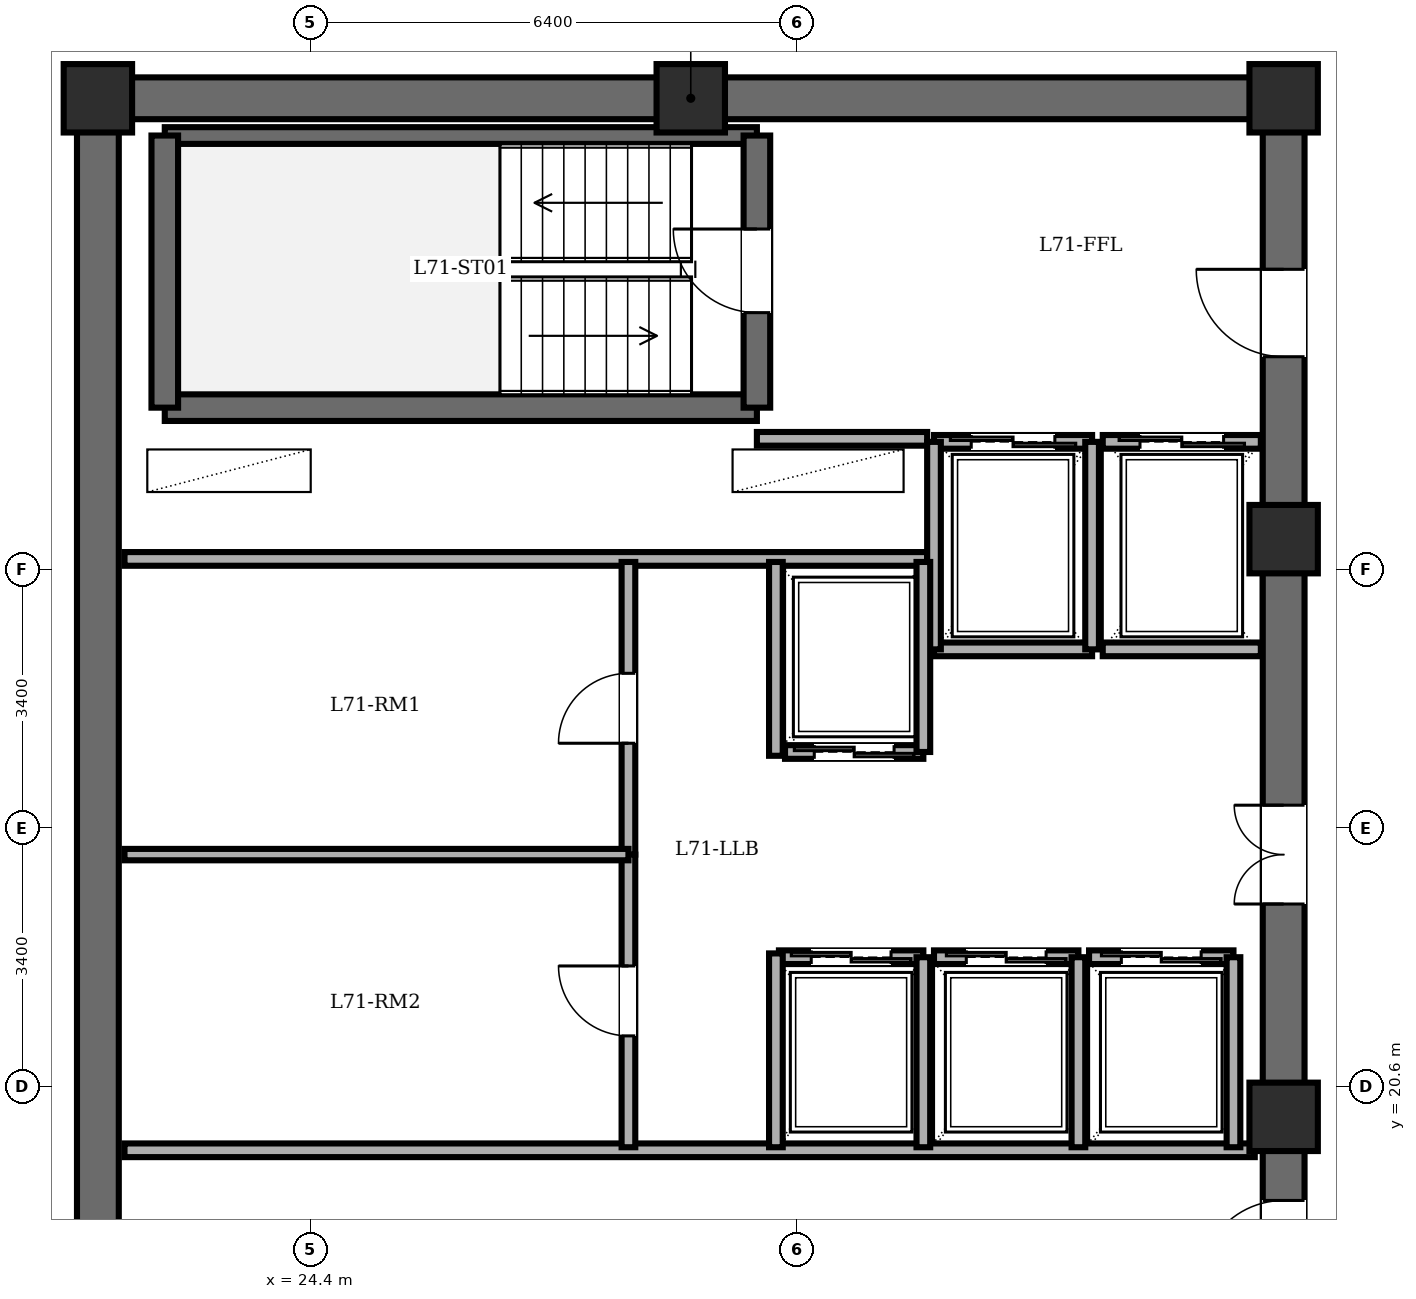
"""IFC4 building model, lengths in metres.
Left out: names, types, materials, properties, quantities, classifications, styles, units other than length and angle.
Written with IfcOpenShell. Run it as: python <this file> out.ifc"""

import sys

from ifc_helpers import new_model, si_unit, direction, frame, frame_2d, origin, origin_2d, place, context, subcontext, project, spatial, rectangle, extrude, element, fill, save


model = new_model("IFC4")
c1 = context("Model", 3, precision=1e-05, world=origin(), true_north=direction((0.0, 1.0)))
c2 = subcontext(c1, "Body", "Model", "MODEL_VIEW")
j1 = project(units=[si_unit("LENGTHUNIT", "METRE"), si_unit("PLANEANGLEUNIT", "RADIAN")], contexts=[c1])
p1 = place(None, origin())
s1 = spatial("IfcSite", under=j1, at=p1, CompositionType="ELEMENT")
p2 = place(p1, origin())
s2 = spatial("IfcBuilding", under=s1, at=p2, CompositionType="ELEMENT")
p3 = place(p2, frame((0.0, 0.0, 273.4)))
s3 = spatial("IfcBuildingStorey", under=s2, at=p3, CompositionType="ELEMENT", Elevation=273.4)
for number, where, z_axis, x_axis in (
    (1, (37.2, 20.2, 0.0), (0.0, 0.0, 1.0), (1.0, 0.0, 0.0)),
    (2, (37.2, 27.8, 0.0), (0.0, 0.0, 1.0), (1.0, 0.0, 0.0)),
    (3, (37.2, 33.6, 0.0), (0.0, 0.0, 1.0), (1.0, 0.0, 0.0)),
    (4, (29.4, 33.6, 0.0), (0.0, 0.0, 1.0), (1.0, 0.0, 0.0)),
    (5, (21.6, 33.6, 0.0), (0.0, 0.0, 1.0), (1.0, 0.0, 0.0)),
):
    element("IfcColumn", number, at=place(p3, frame(where, z_axis=z_axis, x_axis=x_axis)), inside=s3, PredefinedType="COLUMN", context=c2, shape_type="SweptSolid", body=[
        extrude(rectangle(XDim=0.9, YDim=0.9, at=origin_2d()), origin(), (0.0, 0.0, 1.0), 3.65),
    ])
p4 = place(p3, frame((21.6, 14.4, 0.0), z_axis=(0.0, 0.0, 1.0), x_axis=(0.0, 1.0, 0.0)))
e6 = element("IfcWall", 6, at=p4, inside=s3, PredefinedType="SHEAR", context=c2, shape_type="SweptSolid", body=[
    extrude(rectangle(XDim=19.2, YDim=0.55, at=frame_2d((9.6, 0.0))), origin(), (0.0, 0.0, 1.0), 3.45),
])
p5 = place(p3, frame((21.6, 33.6, 0.0), z_axis=(0.0, 0.0, 1.0), x_axis=(1.0, 0.0, 0.0)))
e7 = element("IfcWall", 7, at=p5, inside=s3, PredefinedType="SHEAR", context=c2, shape_type="SweptSolid", body=[
    extrude(rectangle(XDim=15.6, YDim=0.55, at=frame_2d((7.8, 0.0))), origin(), (0.0, 0.0, 1.0), 3.45),
])
p6 = place(p3, frame((37.2, 14.4, 0.0), z_axis=(0.0, 0.0, 1.0), x_axis=(0.0, 1.0, 0.0)))
e8 = element("IfcWall", 8, at=p6, inside=s3, PredefinedType="SHEAR", context=c2, shape_type="SweptSolid", body=[
    extrude(rectangle(XDim=19.2, YDim=0.55, at=frame_2d((9.6, 0.0))), origin(), (0.0, 0.0, 1.0), 3.45),
])
p7 = place(p6, frame((15.8, 0.0, 0.0)))
e9 = element("IfcOpeningElement", 9, at=p7, cuts=e8, PredefinedType="OPENING", context=c2, shape_type="SweptSolid", body=[
    extrude(rectangle(XDim=1.15, YDim=2.15, at=frame_2d((0.575, 1.075))), frame((0.0, 0.285, 0.0), z_axis=(0.0, -1.0, 0.0), x_axis=(1.0, 0.0, 0.0)), (0.0, 0.0, 1.0), 0.57),
])
p8 = place(p6, frame((3.6, 0.0, 0.0)))
e10 = element("IfcOpeningElement", 10, at=p8, cuts=e8, PredefinedType="OPENING", context=c2, shape_type="SweptSolid", body=[
    extrude(rectangle(XDim=1.1, YDim=2.15, at=frame_2d((0.55, 1.075))), frame((0.0, 0.285, 0.0), z_axis=(0.0, -1.0, 0.0), x_axis=(1.0, 0.0, 0.0)), (0.0, 0.0, 1.0), 0.57),
])
p9 = place(p6, frame((8.6, 0.0, 0.0)))
e11 = element("IfcOpeningElement", 11, at=p9, cuts=e8, PredefinedType="OPENING", context=c2, shape_type="SweptSolid", body=[
    extrude(rectangle(XDim=1.3, YDim=2.2, at=frame_2d((0.65, 1.1))), frame((0.0, 0.285, 0.0), z_axis=(0.0, -1.0, 0.0), x_axis=(1.0, 0.0, 0.0)), (0.0, 0.0, 1.0), 0.57),
])
p10 = place(p3, frame((22.48, 29.53, 0.0), z_axis=(0.0, 0.0, 1.0), x_axis=(1.0, 0.0, 0.0)))
e12 = element("IfcWall", 12, at=p10, inside=s3, PredefinedType="SOLIDWALL", context=c2, shape_type="SweptSolid", body=[
    extrude(rectangle(XDim=7.79, YDim=0.35, at=frame_2d((3.895, 0.0))), origin(), (0.0, 0.0, 1.0), 3.45),
])
p11 = place(p3, frame((22.48, 33.11, 0.0), z_axis=(0.0, 0.0, 1.0), x_axis=(1.0, 0.0, 0.0)))
e13 = element("IfcWall", 13, at=p11, inside=s3, PredefinedType="PARTITIONING", context=c2, shape_type="SweptSolid", body=[
    extrude(rectangle(XDim=7.79, YDim=0.22, at=frame_2d((3.895, 0.0))), origin(), (0.0, 0.0, 1.0), 3.45),
])
p12 = place(p3, frame((22.48, 29.53, 0.0), z_axis=(0.0, 0.0, 1.0), x_axis=(0.0, 1.0, 0.0)))
e14 = element("IfcWall", 14, at=p12, inside=s3, PredefinedType="SOLIDWALL", context=c2, shape_type="SweptSolid", body=[
    extrude(rectangle(XDim=3.58, YDim=0.35, at=frame_2d((1.79, 0.0))), origin(), (0.0, 0.0, 1.0), 3.45),
])
p13 = place(p3, frame((30.27, 29.53, 0.0), z_axis=(0.0, 0.0, 1.0), x_axis=(0.0, 1.0, 0.0)))
e15 = element("IfcWall", 15, at=p13, inside=s3, PredefinedType="SOLIDWALL", context=c2, shape_type="SweptSolid", body=[
    extrude(rectangle(XDim=3.58, YDim=0.35, at=frame_2d((1.79, 0.0))), origin(), (0.0, 0.0, 1.0), 3.45),
])
p14 = place(p13, frame((1.25, 0.0, 0.0)))
e16 = element("IfcOpeningElement", 16, at=p14, cuts=e15, PredefinedType="OPENING", context=c2, shape_type="SweptSolid", body=[
    extrude(rectangle(XDim=1.1, YDim=2.15, at=frame_2d((0.55, 1.075))), frame((0.0, 0.185, 0.0), z_axis=(0.0, -1.0, 0.0), x_axis=(1.0, 0.0, 0.0)), (0.0, 0.0, 1.0), 0.37),
])
p15 = place(p3, frame((30.27, 29.12, 0.0), z_axis=(0.0, 0.0, 1.0), x_axis=(1.0, 0.0, 0.0)))
e17 = element("IfcWall", 17, at=p15, inside=s3, PredefinedType="PARTITIONING", context=c2, shape_type="SweptSolid", body=[
    extrude(rectangle(XDim=2.24, YDim=0.18, at=frame_2d((1.12, 0.0))), origin(), (0.0, 0.0, 1.0), 3.45),
])
p16 = place(p3, frame((21.95, 27.54, 0.0), z_axis=(0.0, 0.0, 1.0), x_axis=(1.0, 0.0, 0.0)))
e18 = element("IfcWall", 18, at=p16, inside=s3, PredefinedType="PARTITIONING", context=c2, shape_type="SweptSolid", body=[
    extrude(rectangle(XDim=10.56, YDim=0.18, at=frame_2d((5.28, 0.0))), origin(), (0.0, 0.0, 1.0), 3.45),
])
p17 = place(p3, frame((21.95, 19.76, 0.0), z_axis=(0.0, 0.0, 1.0), x_axis=(1.0, 0.0, 0.0)))
e19 = element("IfcWall", 19, at=p17, inside=s3, PredefinedType="PARTITIONING", context=c2, shape_type="SweptSolid", body=[
    extrude(rectangle(XDim=14.87, YDim=0.18, at=frame_2d((7.435, 0.0))), origin(), (0.0, 0.0, 1.0), 3.45),
])
p18 = place(p3, frame((32.6, 29.08, 0.0), z_axis=(0.0, 0.0, 1.0), x_axis=(1.0, 0.0, 0.0)))
e20 = element("IfcWall", 20, at=p18, inside=s3, PredefinedType="PARTITIONING", context=c2, shape_type="SweptSolid", body=[
    extrude(rectangle(XDim=2.08, YDim=0.18, at=frame_2d((1.04, 0.0))), origin(), (0.0, 0.0, 1.0), 3.45),
])
p19 = place(p18, frame((0.49, 0.0, 0.0)))
e21 = element("IfcOpeningElement", 21, at=p19, cuts=e20, PredefinedType="OPENING", context=c2, shape_type="SweptSolid", body=[
    extrude(rectangle(XDim=1.1, YDim=2.2, at=frame_2d((0.55, 1.1))), frame((0.0, 0.1, 0.0), z_axis=(0.0, -1.0, 0.0), x_axis=(1.0, 0.0, 0.0)), (0.0, 0.0, 1.0), 0.2),
])
p20 = place(p3, frame((34.68, 26.35, 0.0), z_axis=(0.0, 0.0, 1.0), x_axis=(-1.0, 0.0, 0.0)))
e22 = element("IfcWall", 22, at=p20, inside=s3, PredefinedType="PARTITIONING", context=c2, shape_type="SweptSolid", body=[
    extrude(rectangle(XDim=2.08, YDim=0.18, at=frame_2d((1.04, 0.0))), origin(), (0.0, 0.0, 1.0), 3.45),
])
for number, where, z_axis, x_axis in (
    (23, (34.68, 26.35, 0.0), (0.0, 0.0, 1.0), (0.0, 1.0, 0.0)),
    (24, (32.6, 29.08, 0.0), (0.0, 0.0, 1.0), (0.0, -1.0, 0.0)),
):
    element("IfcWall", number, at=place(p3, frame(where, z_axis=z_axis, x_axis=x_axis)), inside=s3, PredefinedType="PARTITIONING", context=c2, shape_type="SweptSolid", body=[
        extrude(rectangle(XDim=2.73, YDim=0.18, at=frame_2d((1.365, 0.0))), origin(), (0.0, 0.0, 1.0), 3.45),
    ])
p21 = place(p3, frame((34.82, 29.08, 0.0), z_axis=(0.0, 0.0, 1.0), x_axis=(1.0, 0.0, 0.0)))
e25 = element("IfcWall", 25, at=p21, inside=s3, PredefinedType="PARTITIONING", context=c2, shape_type="SweptSolid", body=[
    extrude(rectangle(XDim=2.08, YDim=0.18, at=frame_2d((1.04, 0.0))), origin(), (0.0, 0.0, 1.0), 3.45),
])
p22 = place(p21, frame((0.49, 0.0, 0.0)))
e26 = element("IfcOpeningElement", 26, at=p22, cuts=e25, PredefinedType="OPENING", context=c2, shape_type="SweptSolid", body=[
    extrude(rectangle(XDim=1.1, YDim=2.2, at=frame_2d((0.55, 1.1))), frame((0.0, 0.1, 0.0), z_axis=(0.0, -1.0, 0.0), x_axis=(1.0, 0.0, 0.0)), (0.0, 0.0, 1.0), 0.2),
])
p23 = place(p3, frame((36.9, 26.35, 0.0), z_axis=(0.0, 0.0, 1.0), x_axis=(-1.0, 0.0, 0.0)))
e27 = element("IfcWall", 27, at=p23, inside=s3, PredefinedType="PARTITIONING", context=c2, shape_type="SweptSolid", body=[
    extrude(rectangle(XDim=2.08, YDim=0.18, at=frame_2d((1.04, 0.0))), origin(), (0.0, 0.0, 1.0), 3.45),
])
p24 = place(p3, frame((32.46, 25.0, 0.0), z_axis=(0.0, 0.0, 1.0), x_axis=(-1.0, 0.0, 0.0)))
e28 = element("IfcWall", 28, at=p24, inside=s3, PredefinedType="PARTITIONING", context=c2, shape_type="SweptSolid", body=[
    extrude(rectangle(XDim=1.82, YDim=0.18, at=frame_2d((0.91, 0.0))), origin(), (0.0, 0.0, 1.0), 3.45),
])
p25 = place(p24, frame((0.385, 0.0, 0.0)))
e29 = element("IfcOpeningElement", 29, at=p25, cuts=e28, PredefinedType="OPENING", context=c2, shape_type="SweptSolid", body=[
    extrude(rectangle(XDim=1.05, YDim=2.2, at=frame_2d((0.525, 1.1))), frame((0.0, 0.1, 0.0), z_axis=(0.0, -1.0, 0.0), x_axis=(1.0, 0.0, 0.0)), (0.0, 0.0, 1.0), 0.2),
])
p26 = place(p3, frame((32.46, 25.0, 0.0), z_axis=(0.0, 0.0, 1.0), x_axis=(0.0, 1.0, 0.0)))
e30 = element("IfcWall", 30, at=p26, inside=s3, PredefinedType="PARTITIONING", context=c2, shape_type="SweptSolid", body=[
    extrude(rectangle(XDim=2.5, YDim=0.18, at=frame_2d((1.25, 0.0))), origin(), (0.0, 0.0, 1.0), 3.45),
])
p27 = place(p3, frame((30.56, 22.3, 0.0), z_axis=(0.0, 0.0, 1.0), x_axis=(1.0, 0.0, 0.0)))
e31 = element("IfcWall", 31, at=p27, inside=s3, PredefinedType="PARTITIONING", context=c2, shape_type="SweptSolid", body=[
    extrude(rectangle(XDim=1.9, YDim=0.18, at=frame_2d((0.95, 0.0))), origin(), (0.0, 0.0, 1.0), 3.45),
])
p28 = place(p27, frame((0.425, 0.0, 0.0)))
e32 = element("IfcOpeningElement", 32, at=p28, cuts=e31, PredefinedType="OPENING", context=c2, shape_type="SweptSolid", body=[
    extrude(rectangle(XDim=1.05, YDim=2.2, at=frame_2d((0.525, 1.1))), frame((0.0, 0.1, 0.0), z_axis=(0.0, -1.0, 0.0), x_axis=(1.0, 0.0, 0.0)), (0.0, 0.0, 1.0), 0.2),
])
p29 = place(p3, frame((32.46, 19.8, 0.0), z_axis=(0.0, 0.0, 1.0), x_axis=(0.0, 1.0, 0.0)))
e33 = element("IfcWall", 33, at=p29, inside=s3, PredefinedType="PARTITIONING", context=c2, shape_type="SweptSolid", body=[
    extrude(rectangle(XDim=2.5, YDim=0.18, at=frame_2d((1.25, 0.0))), origin(), (0.0, 0.0, 1.0), 3.45),
])
p30 = place(p3, frame((32.6, 22.3, 0.0), z_axis=(0.0, 0.0, 1.0), x_axis=(1.0, 0.0, 0.0)))
e34 = element("IfcWall", 34, at=p30, inside=s3, PredefinedType="PARTITIONING", context=c2, shape_type="SweptSolid", body=[
    extrude(rectangle(XDim=1.9, YDim=0.18, at=frame_2d((0.95, 0.0))), origin(), (0.0, 0.0, 1.0), 3.45),
])
p31 = place(p30, frame((0.425, 0.0, 0.0)))
e35 = element("IfcOpeningElement", 35, at=p31, cuts=e34, PredefinedType="OPENING", context=c2, shape_type="SweptSolid", body=[
    extrude(rectangle(XDim=1.05, YDim=2.2, at=frame_2d((0.525, 1.1))), frame((0.0, 0.1, 0.0), z_axis=(0.0, -1.0, 0.0), x_axis=(1.0, 0.0, 0.0)), (0.0, 0.0, 1.0), 0.2),
])
p32 = place(p3, frame((34.5, 19.8, 0.0), z_axis=(0.0, 0.0, 1.0), x_axis=(0.0, 1.0, 0.0)))
e36 = element("IfcWall", 36, at=p32, inside=s3, PredefinedType="PARTITIONING", context=c2, shape_type="SweptSolid", body=[
    extrude(rectangle(XDim=2.5, YDim=0.18, at=frame_2d((1.25, 0.0))), origin(), (0.0, 0.0, 1.0), 3.45),
])
p33 = place(p3, frame((34.64, 22.3, 0.0), z_axis=(0.0, 0.0, 1.0), x_axis=(1.0, 0.0, 0.0)))
e37 = element("IfcWall", 37, at=p33, inside=s3, PredefinedType="PARTITIONING", context=c2, shape_type="SweptSolid", body=[
    extrude(rectangle(XDim=1.9, YDim=0.18, at=frame_2d((0.95, 0.0))), origin(), (0.0, 0.0, 1.0), 3.45),
])
p34 = place(p33, frame((0.425, 0.0, 0.0)))
e38 = element("IfcOpeningElement", 38, at=p34, cuts=e37, PredefinedType="OPENING", context=c2, shape_type="SweptSolid", body=[
    extrude(rectangle(XDim=1.05, YDim=2.2, at=frame_2d((0.525, 1.1))), frame((0.0, 0.1, 0.0), z_axis=(0.0, -1.0, 0.0), x_axis=(1.0, 0.0, 0.0)), (0.0, 0.0, 1.0), 0.2),
])
p35 = place(p3, frame((36.54, 19.8, 0.0), z_axis=(0.0, 0.0, 1.0), x_axis=(0.0, 1.0, 0.0)))
e39 = element("IfcWall", 39, at=p35, inside=s3, PredefinedType="PARTITIONING", context=c2, shape_type="SweptSolid", body=[
    extrude(rectangle(XDim=2.5, YDim=0.18, at=frame_2d((1.25, 0.0))), origin(), (0.0, 0.0, 1.0), 3.45),
])
for number, where, z_axis, x_axis in (
    (40, (30.52, 24.95, 0.0), (0.0, 0.0, 1.0), (0.0, 1.0, 0.0)),
    (41, (30.52, 19.8, 0.0), (0.0, 0.0, 1.0), (0.0, 1.0, 0.0)),
):
    element("IfcWall", number, at=place(p3, frame(where, z_axis=z_axis, x_axis=x_axis)), inside=s3, PredefinedType="PARTITIONING", context=c2, shape_type="SweptSolid", body=[
        extrude(rectangle(XDim=2.55, YDim=0.18, at=frame_2d((1.275, 0.0))), origin(), (0.0, 0.0, 1.0), 3.45),
    ])
p36 = place(p3, frame((28.58, 23.65, 0.0), z_axis=(0.0, 0.0, 1.0), x_axis=(0.0, 1.0, 0.0)))
e42 = element("IfcWall", 42, at=p36, inside=s3, PredefinedType="PARTITIONING", context=c2, shape_type="SweptSolid", body=[
    extrude(rectangle(XDim=3.85, YDim=0.18, at=frame_2d((1.925, 0.0))), origin(), (0.0, 0.0, 1.0), 3.45),
])
p37 = place(p36, frame((1.465, 0.0, 0.0)))
e43 = element("IfcOpeningElement", 43, at=p37, cuts=e42, PredefinedType="OPENING", context=c2, shape_type="SweptSolid", body=[
    extrude(rectangle(XDim=0.92, YDim=2.1, at=frame_2d((0.46, 1.05))), frame((0.0, 0.1, 0.0), z_axis=(0.0, -1.0, 0.0), x_axis=(1.0, 0.0, 0.0)), (0.0, 0.0, 1.0), 0.2),
])
p38 = place(p3, frame((28.58, 19.8, 0.0), z_axis=(0.0, 0.0, 1.0), x_axis=(0.0, 1.0, 0.0)))
e44 = element("IfcWall", 44, at=p38, inside=s3, PredefinedType="PARTITIONING", context=c2, shape_type="SweptSolid", body=[
    extrude(rectangle(XDim=3.85, YDim=0.18, at=frame_2d((1.925, 0.0))), origin(), (0.0, 0.0, 1.0), 3.45),
])
p39 = place(p38, frame((1.465, 0.0, 0.0)))
e45 = element("IfcOpeningElement", 45, at=p39, cuts=e44, PredefinedType="OPENING", context=c2, shape_type="SweptSolid", body=[
    extrude(rectangle(XDim=0.92, YDim=2.1, at=frame_2d((0.46, 1.05))), frame((0.0, 0.1, 0.0), z_axis=(0.0, -1.0, 0.0), x_axis=(1.0, 0.0, 0.0)), (0.0, 0.0, 1.0), 0.2),
])
p40 = place(p3, frame((21.95, 23.65, 0.0), z_axis=(0.0, 0.0, 1.0), x_axis=(1.0, 0.0, 0.0)))
e46 = element("IfcWall", 46, at=p40, inside=s3, PredefinedType="PARTITIONING", context=c2, shape_type="SweptSolid", body=[
    extrude(rectangle(XDim=6.63, YDim=0.15, at=frame_2d((3.315, 0.0))), origin(), (0.0, 0.0, 1.0), 3.45),
])
p41 = place(p14, origin())
e47 = element("IfcDoor", 47, at=p41, inside=s3, OperationType="SINGLE_SWING_RIGHT", PredefinedType="DOOR", context=c2, shape_type="SweptSolid", body=[
    extrude(rectangle(XDim=1.1, YDim=2.15, at=frame_2d((0.55, 1.075))), frame((0.0, 0.025, 0.0), z_axis=(0.0, -1.0, 0.0), x_axis=(1.0, 0.0, 0.0)), (0.0, 0.0, 1.0), 0.05),
])
fill(e16, e47)
p42 = place(p7, origin())
e48 = element("IfcDoor", 48, at=p42, inside=s3, OperationType="SINGLE_SWING_RIGHT", PredefinedType="DOOR", context=c2, shape_type="SweptSolid", body=[
    extrude(rectangle(XDim=1.15, YDim=2.15, at=frame_2d((0.575, 1.075))), frame((0.0, 0.025, 0.0), z_axis=(0.0, -1.0, 0.0), x_axis=(1.0, 0.0, 0.0)), (0.0, 0.0, 1.0), 0.05),
])
fill(e9, e48)
p43 = place(p8, origin())
e49 = element("IfcDoor", 49, at=p43, inside=s3, OperationType="SINGLE_SWING_LEFT", PredefinedType="DOOR", context=c2, shape_type="SweptSolid", body=[
    extrude(rectangle(XDim=1.1, YDim=2.15, at=frame_2d((0.55, 1.075))), frame((0.0, 0.025, 0.0), z_axis=(0.0, -1.0, 0.0), x_axis=(1.0, 0.0, 0.0)), (0.0, 0.0, 1.0), 0.05),
])
fill(e10, e49)
p44 = place(p19, origin())
e50 = element("IfcDoor", 50, at=p44, inside=s3, OperationType="DOUBLE_DOOR_SLIDING", PredefinedType="DOOR", context=c2, shape_type="SweptSolid", body=[
    extrude(rectangle(XDim=1.1, YDim=2.2, at=frame_2d((0.55, 1.1))), frame((0.0, 0.025, 0.0), z_axis=(0.0, -1.0, 0.0), x_axis=(1.0, 0.0, 0.0)), (0.0, 0.0, 1.0), 0.05),
])
fill(e21, e50)
p45 = place(p22, origin())
e51 = element("IfcDoor", 51, at=p45, inside=s3, OperationType="DOUBLE_DOOR_SLIDING", PredefinedType="DOOR", context=c2, shape_type="SweptSolid", body=[
    extrude(rectangle(XDim=1.1, YDim=2.2, at=frame_2d((0.55, 1.1))), frame((0.0, 0.025, 0.0), z_axis=(0.0, -1.0, 0.0), x_axis=(1.0, 0.0, 0.0)), (0.0, 0.0, 1.0), 0.05),
])
fill(e26, e51)
p46 = place(p25, origin())
e52 = element("IfcDoor", 52, at=p46, inside=s3, OperationType="DOUBLE_DOOR_SLIDING", PredefinedType="DOOR", context=c2, shape_type="SweptSolid", body=[
    extrude(rectangle(XDim=1.05, YDim=2.2, at=frame_2d((0.525, 1.1))), frame((0.0, 0.025, 0.0), z_axis=(0.0, -1.0, 0.0), x_axis=(1.0, 0.0, 0.0)), (0.0, 0.0, 1.0), 0.05),
])
fill(e29, e52)
p47 = place(p28, origin())
e53 = element("IfcDoor", 53, at=p47, inside=s3, OperationType="DOUBLE_DOOR_SLIDING", PredefinedType="DOOR", context=c2, shape_type="SweptSolid", body=[
    extrude(rectangle(XDim=1.05, YDim=2.2, at=frame_2d((0.525, 1.1))), frame((0.0, 0.025, 0.0), z_axis=(0.0, -1.0, 0.0), x_axis=(1.0, 0.0, 0.0)), (0.0, 0.0, 1.0), 0.05),
])
fill(e32, e53)
p48 = place(p31, origin())
e54 = element("IfcDoor", 54, at=p48, inside=s3, OperationType="DOUBLE_DOOR_SLIDING", PredefinedType="DOOR", context=c2, shape_type="SweptSolid", body=[
    extrude(rectangle(XDim=1.05, YDim=2.2, at=frame_2d((0.525, 1.1))), frame((0.0, 0.025, 0.0), z_axis=(0.0, -1.0, 0.0), x_axis=(1.0, 0.0, 0.0)), (0.0, 0.0, 1.0), 0.05),
])
fill(e35, e54)
p49 = place(p34, origin())
e55 = element("IfcDoor", 55, at=p49, inside=s3, OperationType="DOUBLE_DOOR_SLIDING", PredefinedType="DOOR", context=c2, shape_type="SweptSolid", body=[
    extrude(rectangle(XDim=1.05, YDim=2.2, at=frame_2d((0.525, 1.1))), frame((0.0, 0.025, 0.0), z_axis=(0.0, -1.0, 0.0), x_axis=(1.0, 0.0, 0.0)), (0.0, 0.0, 1.0), 0.05),
])
fill(e38, e55)
p50 = place(p37, origin())
e56 = element("IfcDoor", 56, at=p50, inside=s3, OperationType="SINGLE_SWING_LEFT", PredefinedType="DOOR", context=c2, shape_type="SweptSolid", body=[
    extrude(rectangle(XDim=0.92, YDim=2.1, at=frame_2d((0.46, 1.05))), frame((0.0, 0.025, 0.0), z_axis=(0.0, -1.0, 0.0), x_axis=(1.0, 0.0, 0.0)), (0.0, 0.0, 1.0), 0.05),
])
fill(e43, e56)
p51 = place(p39, origin())
e57 = element("IfcDoor", 57, at=p51, inside=s3, OperationType="SINGLE_SWING_RIGHT", PredefinedType="DOOR", context=c2, shape_type="SweptSolid", body=[
    extrude(rectangle(XDim=0.92, YDim=2.1, at=frame_2d((0.46, 1.05))), frame((0.0, 0.025, 0.0), z_axis=(0.0, -1.0, 0.0), x_axis=(1.0, 0.0, 0.0)), (0.0, 0.0, 1.0), 0.05),
])
fill(e45, e57)
p52 = place(p9, origin())
e58 = element("IfcDoor", 58, at=p52, inside=s3, OperationType="DOUBLE_DOOR_SINGLE_SWING", PredefinedType="DOOR", context=c2, shape_type="SweptSolid", body=[
    extrude(rectangle(XDim=1.3, YDim=2.2, at=frame_2d((0.65, 1.1))), frame((0.0, 0.025, 0.0), z_axis=(0.0, -1.0, 0.0), x_axis=(1.0, 0.0, 0.0)), (0.0, 0.0, 1.0), 0.05),
])
fill(e11, e58)
save(model, sys.argv[1])
